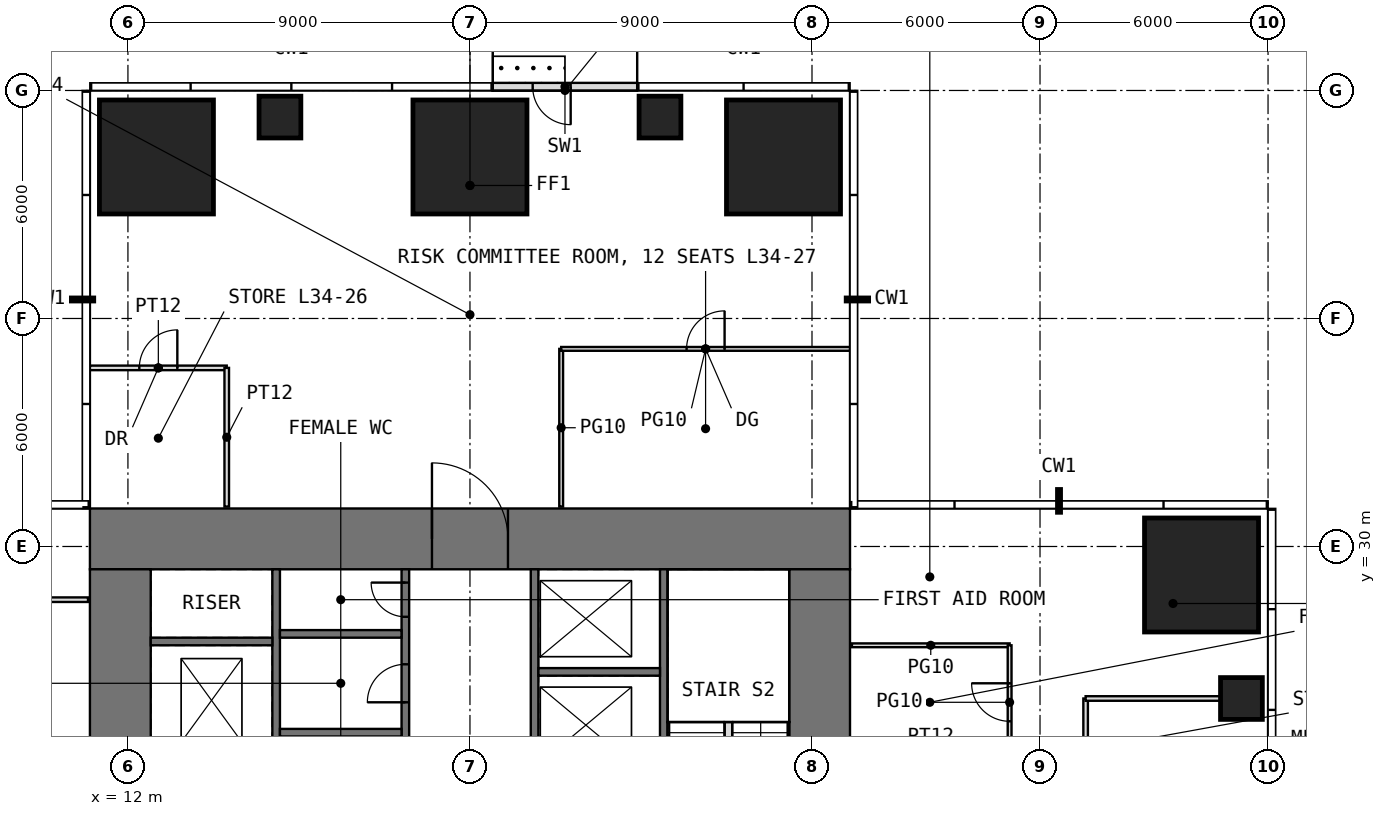
"""IFC4 building model, lengths in metres.
Left out: names, types, materials, properties, quantities, classifications, styles, units other than length and angle.
Written with IfcOpenShell. Run it as: python <this file> out.ifc"""

import sys

from ifc_helpers import new_model, si_unit, direction, frame, frame_2d, origin, origin_2d, place, context, subcontext, project, spatial, rectangle, extrude, element, fill, save


model = new_model("IFC4")
c1 = context("Model", 3, precision=1e-05, world=origin(), true_north=direction((0.0, 1.0)))
c2 = subcontext(c1, "Body", "Model", "MODEL_VIEW")
j1 = project(units=[si_unit("LENGTHUNIT", "METRE"), si_unit("PLANEANGLEUNIT", "RADIAN")], contexts=[c1])
p1 = place(None, origin())
s1 = spatial("IfcSite", under=j1, at=p1, CompositionType="ELEMENT")
p2 = place(p1, origin())
s2 = spatial("IfcBuilding", under=s1, at=p2, CompositionType="ELEMENT")
p3 = place(p2, frame((0.0, 0.0, 144.5)))
s3 = spatial("IfcBuildingStorey", under=s2, at=p3, CompositionType="ELEMENT", Elevation=144.5)
p4 = place(p3, frame((41.3, 26.0, 0.0), z_axis=(0.0, 0.0, 1.0), x_axis=(1.0, 0.0, 0.0)))
e1 = element("IfcColumn", 1, at=p4, inside=s3, PredefinedType="COLUMN", context=c2, shape_type="SweptSolid", body=[
    extrude(rectangle(XDim=1.1, YDim=1.1, at=origin_2d()), origin(), (0.0, 0.0, 1.0), 4.0),
])
for number, where, z_axis, x_axis in (
    (2, (40.25, 29.25, 0.0), (0.0, 0.0, 1.0), (1.0, 0.0, 0.0)),
    (3, (12.75, 40.25, 0.0), (0.0, 0.0, 1.0), (1.0, 0.0, 0.0)),
):
    element("IfcColumn", number, at=place(p3, frame(where, z_axis=z_axis, x_axis=x_axis)), inside=s3, PredefinedType="COLUMN", context=c2, shape_type="SweptSolid", body=[
        extrude(rectangle(XDim=3.0, YDim=3.0, at=origin_2d()), origin(), (0.0, 0.0, 1.0), 4.0),
    ])
p5 = place(p3, frame((16.0, 41.3, 0.0), z_axis=(0.0, 0.0, 1.0), x_axis=(1.0, 0.0, 0.0)))
e4 = element("IfcColumn", 4, at=p5, inside=s3, PredefinedType="COLUMN", context=c2, shape_type="SweptSolid", body=[
    extrude(rectangle(XDim=1.1, YDim=1.1, at=origin_2d()), origin(), (0.0, 0.0, 1.0), 4.0),
])
p6 = place(p3, frame((21.0, 40.25, 0.0), z_axis=(0.0, 0.0, 1.0), x_axis=(1.0, 0.0, 0.0)))
e5 = element("IfcColumn", 5, at=p6, inside=s3, PredefinedType="COLUMN", context=c2, shape_type="SweptSolid", body=[
    extrude(rectangle(XDim=3.0, YDim=3.0, at=origin_2d()), origin(), (0.0, 0.0, 1.0), 4.0),
])
p7 = place(p3, frame((26.0, 41.3, 0.0), z_axis=(0.0, 0.0, 1.0), x_axis=(1.0, 0.0, 0.0)))
e6 = element("IfcColumn", 6, at=p7, inside=s3, PredefinedType="COLUMN", context=c2, shape_type="SweptSolid", body=[
    extrude(rectangle(XDim=1.1, YDim=1.1, at=origin_2d()), origin(), (0.0, 0.0, 1.0), 4.0),
])
p8 = place(p3, frame((29.25, 40.25, 0.0), z_axis=(0.0, 0.0, 1.0), x_axis=(1.0, 0.0, 0.0)))
e7 = element("IfcColumn", 7, at=p8, inside=s3, PredefinedType="COLUMN", context=c2, shape_type="SweptSolid", body=[
    extrude(rectangle(XDim=3.0, YDim=3.0, at=origin_2d()), origin(), (0.0, 0.0, 1.0), 4.0),
])
p9 = place(p3, frame((25.4, 42.1, 0.0), z_axis=(0.0, 0.0, 1.0), x_axis=(-1.0, 0.0, 0.0)))
e8 = element("IfcWall", 8, at=p9, inside=s3, PredefinedType="USERDEFINED", context=c2, shape_type="SweptSolid", body=[
    extrude(rectangle(XDim=3.8, YDim=0.2, at=frame_2d((1.9, 0.0))), origin(), (0.0, 0.0, 1.0), 3.75),
])
p10 = place(p9, frame((1.75, 0.0, 0.0)))
e9 = element("IfcOpeningElement", 9, at=p10, cuts=e8, PredefinedType="OPENING", context=c2, shape_type="SweptSolid", body=[
    extrude(rectangle(XDim=1.0, YDim=2.4, at=frame_2d((0.5, 1.2))), frame((0.0, 0.11, 0.0), z_axis=(0.0, -1.0, 0.0), x_axis=(1.0, 0.0, 0.0)), (0.0, 0.0, 1.0), 0.22),
])
p11 = place(p3, frame((11.0, 30.2, -0.05), z_axis=(0.0, 0.0, 1.0), x_axis=(1.0, 0.0, 0.0)))
e10 = element("IfcWall", 10, at=p11, inside=s3, PredefinedType="SHEAR", context=c2, shape_type="SweptSolid", body=[
    extrude(rectangle(XDim=20.0, YDim=1.6, at=frame_2d((10.0, 0.0))), origin(), (0.0, 0.0, 1.0), 4.0),
])
p12 = place(p11, frame((9.0, 0.0, 0.05)))
e11 = element("IfcOpeningElement", 11, at=p12, cuts=e10, PredefinedType="OPENING", context=c2, shape_type="SweptSolid", body=[
    extrude(rectangle(XDim=2.0, YDim=2.2, at=frame_2d((1.0, 1.1))), frame((0.0, 0.81, 0.0), z_axis=(0.0, -1.0, 0.0), x_axis=(1.0, 0.0, 0.0)), (0.0, 0.0, 1.0), 1.62),
])
p13 = place(p3, frame((11.8, 12.6, -0.05), z_axis=(0.0, 0.0, 1.0), x_axis=(0.0, 1.0, 0.0)))
e12 = element("IfcWall", 12, at=p13, inside=s3, PredefinedType="SHEAR", context=c2, shape_type="SweptSolid", body=[
    extrude(rectangle(XDim=16.8, YDim=1.6, at=frame_2d((8.4, 0.0))), origin(), (0.0, 0.0, 1.0), 4.0),
])
p14 = place(p13, frame((9.9, 0.0, 0.05)))
e13 = element("IfcOpeningElement", 13, at=p14, cuts=e12, PredefinedType="OPENING", context=c2, shape_type="SweptSolid", body=[
    extrude(rectangle(XDim=1.0, YDim=2.2, at=frame_2d((0.5, 1.1))), frame((0.0, 0.81, 0.0), z_axis=(0.0, -1.0, 0.0), x_axis=(1.0, 0.0, 0.0)), (0.0, 0.0, 1.0), 1.62),
])
p15 = place(p3, frame((30.2, 12.6, -0.05), z_axis=(0.0, 0.0, 1.0), x_axis=(0.0, 1.0, 0.0)))
e14 = element("IfcWall", 14, at=p15, inside=s3, PredefinedType="SHEAR", context=c2, shape_type="SweptSolid", body=[
    extrude(rectangle(XDim=16.8, YDim=1.6, at=frame_2d((8.4, 0.0))), origin(), (0.0, 0.0, 1.0), 4.0),
])
p16 = place(p15, frame((5.9, 0.0, 0.05)))
e15 = element("IfcOpeningElement", 15, at=p16, cuts=e14, PredefinedType="OPENING", context=c2, shape_type="SweptSolid", body=[
    extrude(rectangle(XDim=1.0, YDim=2.2, at=frame_2d((0.5, 1.1))), frame((0.0, 0.81, 0.0), z_axis=(0.0, -1.0, 0.0), x_axis=(1.0, 0.0, 0.0)), (0.0, 0.0, 1.0), 1.62),
])
p17 = place(p3, frame((15.9, 12.6, -0.05), z_axis=(0.0, 0.0, 1.0), x_axis=(0.0, 1.0, 0.0)))
e16 = element("IfcWall", 16, at=p17, inside=s3, PredefinedType="SHEAR", context=c2, shape_type="SweptSolid", body=[
    extrude(rectangle(XDim=16.8, YDim=0.2, at=frame_2d((8.4, 0.0))), origin(), (0.0, 0.0, 1.0), 4.0),
])
p18 = place(p17, frame((8.9, 0.0, 0.05)))
e17 = element("IfcOpeningElement", 17, at=p18, cuts=e16, PredefinedType="OPENING", context=c2, shape_type="SweptSolid", body=[
    extrude(rectangle(XDim=1.0, YDim=2.2, at=frame_2d((0.5, 1.1))), frame((0.0, 0.11, 0.0), z_axis=(0.0, -1.0, 0.0), x_axis=(1.0, 0.0, 0.0)), (0.0, 0.0, 1.0), 0.22),
])
p19 = place(p3, frame((19.3, 12.6, -0.05), z_axis=(0.0, 0.0, 1.0), x_axis=(0.0, 1.0, 0.0)))
e18 = element("IfcWall", 18, at=p19, inside=s3, PredefinedType="SHEAR", context=c2, shape_type="SweptSolid", body=[
    extrude(rectangle(XDim=16.8, YDim=0.2, at=frame_2d((8.4, 0.0))), origin(), (0.0, 0.0, 1.0), 4.0),
])
p20 = place(p19, frame((8.7, 0.0, 0.05)))
e19 = element("IfcOpeningElement", 19, at=p20, cuts=e18, PredefinedType="OPENING", context=c2, shape_type="SweptSolid", body=[
    extrude(rectangle(XDim=1.0, YDim=2.2, at=frame_2d((0.5, 1.1))), frame((0.0, 0.11, 0.0), z_axis=(0.0, -1.0, 0.0), x_axis=(1.0, 0.0, 0.0)), (0.0, 0.0, 1.0), 0.22),
])
p21 = place(p19, frame((10.85, 0.0, 0.05)))
e20 = element("IfcOpeningElement", 20, at=p21, cuts=e18, PredefinedType="OPENING", context=c2, shape_type="SweptSolid", body=[
    extrude(rectangle(XDim=0.9, YDim=2.2, at=frame_2d((0.45, 1.1))), frame((0.0, 0.11, 0.0), z_axis=(0.0, -1.0, 0.0), x_axis=(1.0, 0.0, 0.0)), (0.0, 0.0, 1.0), 0.22),
])
p22 = place(p19, frame((13.3, 0.0, 0.05)))
e21 = element("IfcOpeningElement", 21, at=p22, cuts=e18, PredefinedType="OPENING", context=c2, shape_type="SweptSolid", body=[
    extrude(rectangle(XDim=1.0, YDim=2.2, at=frame_2d((0.5, 1.1))), frame((0.0, 0.11, 0.0), z_axis=(0.0, -1.0, 0.0), x_axis=(1.0, 0.0, 0.0)), (0.0, 0.0, 1.0), 0.22),
])
p23 = place(p19, frame((15.55, 0.0, 0.05)))
e22 = element("IfcOpeningElement", 22, at=p23, cuts=e18, PredefinedType="OPENING", context=c2, shape_type="SweptSolid", body=[
    extrude(rectangle(XDim=0.9, YDim=2.2, at=frame_2d((0.45, 1.1))), frame((0.0, 0.11, 0.0), z_axis=(0.0, -1.0, 0.0), x_axis=(1.0, 0.0, 0.0)), (0.0, 0.0, 1.0), 0.22),
])
p24 = place(p19, frame((0.75, 0.0, 0.05)))
e23 = element("IfcOpeningElement", 23, at=p24, cuts=e18, PredefinedType="OPENING", context=c2, shape_type="SweptSolid", body=[
    extrude(rectangle(XDim=1.1, YDim=2.2, at=frame_2d((0.55, 1.1))), frame((0.0, 0.11, 0.0), z_axis=(0.0, -1.0, 0.0), x_axis=(1.0, 0.0, 0.0)), (0.0, 0.0, 1.0), 0.22),
])
p25 = place(p19, frame((3.55, 0.0, 0.05)))
e24 = element("IfcOpeningElement", 24, at=p25, cuts=e18, PredefinedType="OPENING", context=c2, shape_type="SweptSolid", body=[
    extrude(rectangle(XDim=1.1, YDim=2.2, at=frame_2d((0.55, 1.1))), frame((0.0, 0.11, 0.0), z_axis=(0.0, -1.0, 0.0), x_axis=(1.0, 0.0, 0.0)), (0.0, 0.0, 1.0), 0.22),
])
p26 = place(p19, frame((6.35, 0.0, 0.05)))
e25 = element("IfcOpeningElement", 25, at=p26, cuts=e18, PredefinedType="OPENING", context=c2, shape_type="SweptSolid", body=[
    extrude(rectangle(XDim=1.1, YDim=2.2, at=frame_2d((0.55, 1.1))), frame((0.0, 0.11, 0.0), z_axis=(0.0, -1.0, 0.0), x_axis=(1.0, 0.0, 0.0)), (0.0, 0.0, 1.0), 0.22),
])
p27 = place(p3, frame((22.7, 12.6, -0.05), z_axis=(0.0, 0.0, 1.0), x_axis=(0.0, 1.0, 0.0)))
e26 = element("IfcWall", 26, at=p27, inside=s3, PredefinedType="SHEAR", context=c2, shape_type="SweptSolid", body=[
    extrude(rectangle(XDim=16.8, YDim=0.2, at=frame_2d((8.4, 0.0))), origin(), (0.0, 0.0, 1.0), 4.0),
])
p28 = place(p27, frame((3.05, 0.0, 0.05)))
e27 = element("IfcOpeningElement", 27, at=p28, cuts=e26, PredefinedType="OPENING", context=c2, shape_type="SweptSolid", body=[
    extrude(rectangle(XDim=0.9, YDim=2.2, at=frame_2d((0.45, 1.1))), frame((0.0, 0.11, 0.0), z_axis=(0.0, -1.0, 0.0), x_axis=(1.0, 0.0, 0.0)), (0.0, 0.0, 1.0), 0.22),
])
p29 = place(p27, frame((7.1, 0.0, 0.05)))
e28 = element("IfcOpeningElement", 28, at=p29, cuts=e26, PredefinedType="OPENING", context=c2, shape_type="SweptSolid", body=[
    extrude(rectangle(XDim=1.0, YDim=2.2, at=frame_2d((0.5, 1.1))), frame((0.0, 0.11, 0.0), z_axis=(0.0, -1.0, 0.0), x_axis=(1.0, 0.0, 0.0)), (0.0, 0.0, 1.0), 0.22),
])
p30 = place(p27, frame((1.55, 0.0, 0.05)))
e29 = element("IfcOpeningElement", 29, at=p30, cuts=e26, PredefinedType="OPENING", context=c2, shape_type="SweptSolid", body=[
    extrude(rectangle(XDim=0.9, YDim=2.2, at=frame_2d((0.45, 1.1))), frame((0.0, 0.11, 0.0), z_axis=(0.0, -1.0, 0.0), x_axis=(1.0, 0.0, 0.0)), (0.0, 0.0, 1.0), 0.22),
])
p31 = place(p27, frame((4.95, 0.0, 0.05)))
e30 = element("IfcOpeningElement", 30, at=p31, cuts=e26, PredefinedType="OPENING", context=c2, shape_type="SweptSolid", body=[
    extrude(rectangle(XDim=0.9, YDim=2.2, at=frame_2d((0.45, 1.1))), frame((0.0, 0.11, 0.0), z_axis=(0.0, -1.0, 0.0), x_axis=(1.0, 0.0, 0.0)), (0.0, 0.0, 1.0), 0.22),
])
p32 = place(p27, frame((9.4, 0.0, 0.05)))
e31 = element("IfcOpeningElement", 31, at=p32, cuts=e26, PredefinedType="OPENING", context=c2, shape_type="SweptSolid", body=[
    extrude(rectangle(XDim=1.0, YDim=2.2, at=frame_2d((0.5, 1.1))), frame((0.0, 0.11, 0.0), z_axis=(0.0, -1.0, 0.0), x_axis=(1.0, 0.0, 0.0)), (0.0, 0.0, 1.0), 0.22),
])
p33 = place(p3, frame((26.1, 12.6, -0.05), z_axis=(0.0, 0.0, 1.0), x_axis=(0.0, 1.0, 0.0)))
e32 = element("IfcWall", 32, at=p33, inside=s3, PredefinedType="SHEAR", context=c2, shape_type="SweptSolid", body=[
    extrude(rectangle(XDim=16.8, YDim=0.2, at=frame_2d((8.4, 0.0))), origin(), (0.0, 0.0, 1.0), 4.0),
])
p34 = place(p33, frame((6.9, 0.0, 0.05)))
e33 = element("IfcOpeningElement", 33, at=p34, cuts=e32, PredefinedType="OPENING", context=c2, shape_type="SweptSolid", body=[
    extrude(rectangle(XDim=1.0, YDim=2.2, at=frame_2d((0.5, 1.1))), frame((0.0, 0.11, 0.0), z_axis=(0.0, -1.0, 0.0), x_axis=(1.0, 0.0, 0.0)), (0.0, 0.0, 1.0), 0.22),
])
for number, where, z_axis, x_axis in (
    (34, (12.6, 27.5, -0.05), (0.0, 0.0, 1.0), (1.0, 0.0, 0.0)),
    (35, (16.0, 25.1, -0.05), (0.0, 0.0, 1.0), (1.0, 0.0, 0.0)),
    (36, (16.0, 27.7, -0.05), (0.0, 0.0, 1.0), (1.0, 0.0, 0.0)),
    (37, (22.8, 26.7, -0.05), (0.0, 0.0, 1.0), (1.0, 0.0, 0.0)),
):
    element("IfcWall", number, at=place(p3, frame(where, z_axis=z_axis, x_axis=x_axis)), inside=s3, PredefinedType="SHEAR", context=c2, shape_type="SweptSolid", body=[
        extrude(rectangle(XDim=3.2, YDim=0.2, at=frame_2d((1.6, 0.0))), origin(), (0.0, 0.0, 1.0), 4.0),
    ])
p35 = place(p3, frame((7.3, 28.6, 0.0), z_axis=(0.0, 0.0, 1.0), x_axis=(1.0, 0.0, 0.0)))
e38 = element("IfcWall", 38, at=p35, inside=s3, PredefinedType="PARTITIONING", context=c2, shape_type="SweptSolid", body=[
    extrude(rectangle(XDim=3.65, YDim=0.12, at=frame_2d((1.825, 0.0))), origin(), (0.0, 0.0, 1.0), 3.75),
])
p36 = place(p3, frame((11.0, 34.7, 0.0), z_axis=(0.0, 0.0, 1.0), x_axis=(1.0, 0.0, 0.0)))
e39 = element("IfcWall", 39, at=p36, inside=s3, PredefinedType="PARTITIONING", context=c2, shape_type="SweptSolid", body=[
    extrude(rectangle(XDim=3.6, YDim=0.12, at=frame_2d((1.8, 0.0))), origin(), (0.0, 0.0, 1.0), 3.75),
])
p37 = place(p36, frame((1.3, 0.0, 0.0)))
e40 = element("IfcOpeningElement", 40, at=p37, cuts=e39, PredefinedType="OPENING", context=c2, shape_type="SweptSolid", body=[
    extrude(rectangle(XDim=1.0, YDim=2.2, at=frame_2d((0.5, 1.1))), frame((0.0, 0.07, 0.0), z_axis=(0.0, -1.0, 0.0), x_axis=(1.0, 0.0, 0.0)), (0.0, 0.0, 1.0), 0.14),
])
p38 = place(p3, frame((14.6, 31.05, 0.0), z_axis=(0.0, 0.0, 1.0), x_axis=(0.0, 1.0, 0.0)))
e41 = element("IfcWall", 41, at=p38, inside=s3, PredefinedType="PARTITIONING", context=c2, shape_type="SweptSolid", body=[
    extrude(rectangle(XDim=3.65, YDim=0.12, at=frame_2d((1.825, 0.0))), origin(), (0.0, 0.0, 1.0), 3.75),
])
p39 = place(p3, frame((23.4, 31.05, 0.0), z_axis=(0.0, 0.0, 1.0), x_axis=(0.0, 1.0, 0.0)))
e42 = element("IfcWall", 42, at=p39, inside=s3, PredefinedType="PARTITIONING", context=c2, shape_type="SweptSolid", body=[
    extrude(rectangle(XDim=4.15, YDim=0.1, at=frame_2d((2.075, 0.0))), origin(), (0.0, 0.0, 1.0), 3.75),
])
p40 = place(p3, frame((23.4, 35.2, 0.0), z_axis=(0.0, 0.0, 1.0), x_axis=(1.0, 0.0, 0.0)))
e43 = element("IfcWall", 43, at=p40, inside=s3, PredefinedType="PARTITIONING", context=c2, shape_type="SweptSolid", body=[
    extrude(rectangle(XDim=7.6, YDim=0.1, at=frame_2d((3.8, 0.0))), origin(), (0.0, 0.0, 1.0), 3.75),
])
p41 = place(p40, frame((3.3, 0.0, 0.0)))
e44 = element("IfcOpeningElement", 44, at=p41, cuts=e43, PredefinedType="OPENING", context=c2, shape_type="SweptSolid", body=[
    extrude(rectangle(XDim=1.0, YDim=2.4, at=frame_2d((0.5, 1.2))), frame((0.0, 0.06, 0.0), z_axis=(0.0, -1.0, 0.0), x_axis=(1.0, 0.0, 0.0)), (0.0, 0.0, 1.0), 0.12),
])
p42 = place(p3, frame((31.05, 27.4, 0.0), z_axis=(0.0, 0.0, 1.0), x_axis=(1.0, 0.0, 0.0)))
e45 = element("IfcWall", 45, at=p42, inside=s3, PredefinedType="PARTITIONING", context=c2, shape_type="SweptSolid", body=[
    extrude(rectangle(XDim=4.15, YDim=0.1, at=frame_2d((2.075, 0.0))), origin(), (0.0, 0.0, 1.0), 3.75),
])
p43 = place(p3, frame((35.2, 24.4, 0.0), z_axis=(0.0, 0.0, 1.0), x_axis=(0.0, 1.0, 0.0)))
e46 = element("IfcWall", 46, at=p43, inside=s3, PredefinedType="PARTITIONING", context=c2, shape_type="SweptSolid", body=[
    extrude(rectangle(XDim=3.0, YDim=0.1, at=frame_2d((1.5, 0.0))), origin(), (0.0, 0.0, 1.0), 3.75),
])
p44 = place(p43, frame((1.0, 0.0, 0.0)))
e47 = element("IfcOpeningElement", 47, at=p44, cuts=e46, PredefinedType="OPENING", context=c2, shape_type="SweptSolid", body=[
    extrude(rectangle(XDim=1.0, YDim=2.4, at=frame_2d((0.5, 1.2))), frame((0.0, 0.06, 0.0), z_axis=(0.0, -1.0, 0.0), x_axis=(1.0, 0.0, 0.0)), (0.0, 0.0, 1.0), 0.12),
])
p45 = place(p3, frame((37.2, 21.0, 0.0), z_axis=(0.0, 0.0, 1.0), x_axis=(0.0, 1.0, 0.0)))
e48 = element("IfcWall", 48, at=p45, inside=s3, PredefinedType="PARTITIONING", context=c2, shape_type="SweptSolid", body=[
    extrude(rectangle(XDim=5.0, YDim=0.12, at=frame_2d((2.5, 0.0))), origin(), (0.0, 0.0, 1.0), 3.75),
])
p46 = place(p45, frame((2.0, 0.0, 0.0)))
e49 = element("IfcOpeningElement", 49, at=p46, cuts=e48, PredefinedType="OPENING", context=c2, shape_type="SweptSolid", body=[
    extrude(rectangle(XDim=1.0, YDim=2.2, at=frame_2d((0.5, 1.1))), frame((0.0, 0.07, 0.0), z_axis=(0.0, -1.0, 0.0), x_axis=(1.0, 0.0, 0.0)), (0.0, 0.0, 1.0), 0.14),
])
p47 = place(p3, frame((37.2, 26.0, 0.0), z_axis=(0.0, 0.0, 1.0), x_axis=(1.0, 0.0, 0.0)))
e50 = element("IfcWall", 50, at=p47, inside=s3, PredefinedType="PARTITIONING", context=c2, shape_type="SweptSolid", body=[
    extrude(rectangle(XDim=3.54, YDim=0.12, at=frame_2d((1.77, 0.0))), origin(), (0.0, 0.0, 1.0), 3.75),
])
p48 = place(p3, frame((27.8, 22.3, 0.0), z_axis=(0.0, 0.0, 1.0), x_axis=(0.0, 1.0, 0.0)))
e51 = element("IfcWall", 51, at=p48, inside=s3, PredefinedType="PARTITIONING", context=c2, shape_type="SweptSolid", body=[
    extrude(rectangle(XDim=3.08, YDim=0.2, at=frame_2d((1.54, 0.0))), origin(), (0.0, 0.0, 1.0), 4.0),
])
p49 = place(p10, origin())
e52 = element("IfcDoor", 52, at=p49, inside=s3, OperationType="SINGLE_SWING_LEFT", PredefinedType="DOOR", context=c2, shape_type="SweptSolid", body=[
    extrude(rectangle(XDim=1.0, YDim=2.4, at=frame_2d((0.5, 1.2))), frame((0.0, 0.025, 0.0), z_axis=(0.0, -1.0, 0.0), x_axis=(1.0, 0.0, 0.0)), (0.0, 0.0, 1.0), 0.05),
])
fill(e9, e52)
p50 = place(p12, origin())
e53 = element("IfcDoor", 53, at=p50, inside=s3, OperationType="DOUBLE_DOOR_SINGLE_SWING", PredefinedType="DOOR", context=c2, shape_type="SweptSolid", body=[
    extrude(rectangle(XDim=2.0, YDim=2.2, at=frame_2d((1.0, 1.1))), frame((0.0, 0.025, 0.0), z_axis=(0.0, -1.0, 0.0), x_axis=(1.0, 0.0, 0.0)), (0.0, 0.0, 1.0), 0.05),
])
fill(e11, e53)
p51 = place(p22, origin())
e54 = element("IfcDoor", 54, at=p51, inside=s3, OperationType="SINGLE_SWING_LEFT", PredefinedType="DOOR", context=c2, shape_type="SweptSolid", body=[
    extrude(rectangle(XDim=1.0, YDim=2.2, at=frame_2d((0.5, 1.1))), frame((0.0, 0.025, 0.0), z_axis=(0.0, -1.0, 0.0), x_axis=(1.0, 0.0, 0.0)), (0.0, 0.0, 1.0), 0.05),
])
fill(e21, e54)
p52 = place(p23, origin())
e55 = element("IfcDoor", 55, at=p52, inside=s3, OperationType="SINGLE_SWING_RIGHT", PredefinedType="DOOR", context=c2, shape_type="SweptSolid", body=[
    extrude(rectangle(XDim=0.9, YDim=2.2, at=frame_2d((0.45, 1.1))), frame((0.0, 0.025, 0.0), z_axis=(0.0, -1.0, 0.0), x_axis=(1.0, 0.0, 0.0)), (0.0, 0.0, 1.0), 0.05),
])
fill(e22, e55)
p53 = place(p44, origin())
e56 = element("IfcDoor", 56, at=p53, inside=s3, OperationType="SINGLE_SWING_RIGHT", PredefinedType="DOOR", context=c2, shape_type="SweptSolid", body=[
    extrude(rectangle(XDim=1.0, YDim=2.4, at=frame_2d((0.5, 1.2))), frame((0.0, 0.025, 0.0), z_axis=(0.0, -1.0, 0.0), x_axis=(1.0, 0.0, 0.0)), (0.0, 0.0, 1.0), 0.05),
])
fill(e47, e56)
p54 = place(p37, origin())
e57 = element("IfcDoor", 57, at=p54, inside=s3, OperationType="SINGLE_SWING_RIGHT", PredefinedType="DOOR", context=c2, shape_type="SweptSolid", body=[
    extrude(rectangle(XDim=1.0, YDim=2.2, at=frame_2d((0.5, 1.1))), frame((0.0, 0.025, 0.0), z_axis=(0.0, -1.0, 0.0), x_axis=(1.0, 0.0, 0.0)), (0.0, 0.0, 1.0), 0.05),
])
fill(e40, e57)
p55 = place(p41, origin())
e58 = element("IfcDoor", 58, at=p55, inside=s3, OperationType="SINGLE_SWING_RIGHT", PredefinedType="DOOR", context=c2, shape_type="SweptSolid", body=[
    extrude(rectangle(XDim=1.0, YDim=2.4, at=frame_2d((0.5, 1.2))), frame((0.0, 0.025, 0.0), z_axis=(0.0, -1.0, 0.0), x_axis=(1.0, 0.0, 0.0)), (0.0, 0.0, 1.0), 0.05),
])
fill(e44, e58)
save(model, sys.argv[1])
